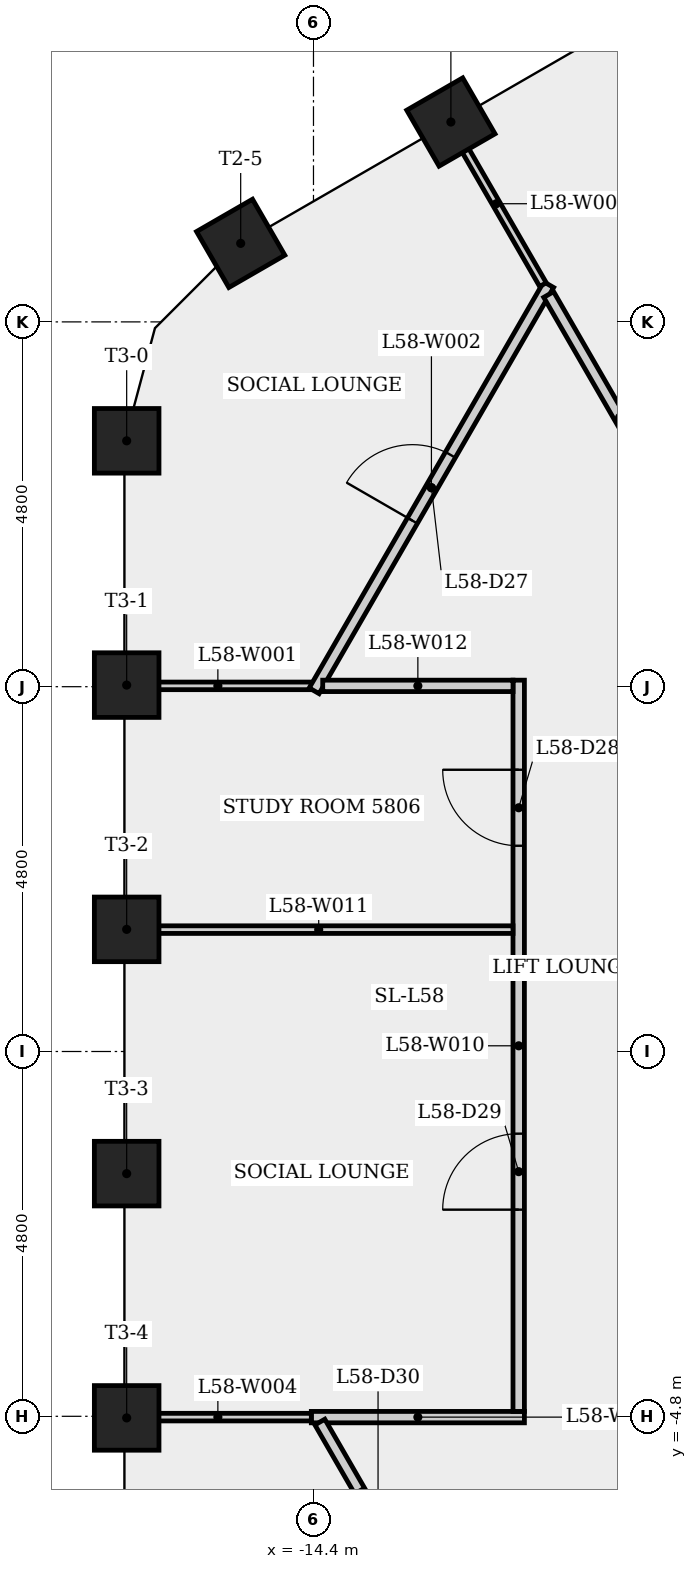
"""IFC4 building model, lengths in metres.
Left out: names, types, materials, properties, quantities, classifications, styles, units other than length and angle.
Written with IfcOpenShell. Run it as: python <this file> out.ifc"""

import sys

from ifc_helpers import new_model, si_unit, direction, frame, frame_2d, origin, origin_2d, place, context, subcontext, project, spatial, rectangle, extrude, element, fill, save


model = new_model("IFC4")
c1 = context("Model", 3, precision=1e-05, world=origin(), true_north=direction((0.0, 1.0)))
c2 = subcontext(c1, "Body", "Model", "MODEL_VIEW")
j1 = project(units=[si_unit("LENGTHUNIT", "METRE"), si_unit("PLANEANGLEUNIT", "RADIAN")], contexts=[c1])
p1 = place(None, origin())
s1 = spatial("IfcSite", under=j1, at=p1, CompositionType="ELEMENT")
p2 = place(p1, origin())
s2 = spatial("IfcBuilding", under=s1, at=p2, CompositionType="ELEMENT")
p3 = place(p2, frame((0.0, 0.0, 218.9)))
s3 = spatial("IfcBuildingStorey", under=s2, at=p3, CompositionType="ELEMENT", Elevation=218.9)
for number, where, z_axis, x_axis in (
    (1, (-12.592, 12.23, 0.0), (0.0, 0.0, 1.0), (-0.5, 0.866, 0.0)),
    (2, (-15.358, 10.633, 0.0), (0.0, 0.0, 1.0), (-0.5, 0.866, 0.0)),
    (3, (-16.858, 8.035, 0.0), (0.0, 0.0, 1.0), (-1.0, 0.0, 0.0)),
    (4, (-16.858, 4.821, 0.0), (0.0, 0.0, 1.0), (-1.0, 0.0, 0.0)),
    (5, (-16.858, 1.607, 0.0), (0.0, 0.0, 1.0), (-1.0, 0.0, 0.0)),
    (6, (-16.858, -1.607, 0.0), (0.0, 0.0, 1.0), (-1.0, 0.0, 0.0)),
    (7, (-16.858, -4.821, 0.0), (0.0, 0.0, 1.0), (-1.0, 0.0, 0.0)),
):
    element("IfcColumn", number, at=place(p3, frame(where, z_axis=z_axis, x_axis=x_axis)), inside=s3, PredefinedType="COLUMN", context=c2, shape_type="SweptSolid", body=[
        extrude(rectangle(XDim=0.85, YDim=0.85, at=origin_2d()), origin(), (0.0, 0.0, 1.0), 3.4),
    ])
p4 = place(p3, frame((-14.428, 4.811, 0.0), z_axis=(0.0, 0.0, 1.0), x_axis=(-1.0, 0.0, 0.0)))
e8 = element("IfcWall", 8, at=p4, inside=s3, PredefinedType="PARTITIONING", context=c2, shape_type="SweptSolid", body=[
    extrude(rectangle(XDim=2.459, YDim=0.1, at=frame_2d((1.229, 0.0))), origin(), (0.0, 0.0, 1.0), 3.05),
])
p5 = place(p3, frame((-14.391, 4.746, 0.0), z_axis=(0.0, 0.0, 1.0), x_axis=(0.500023814363, 0.866011654119, 0.0)))
e9 = element("IfcWall", 9, at=p5, inside=s3, PredefinedType="PARTITIONING", context=c2, shape_type="SweptSolid", body=[
    extrude(rectangle(XDim=6.171, YDim=0.15, at=frame_2d((3.085, 0.0))), origin(), (0.0, 0.0, 1.0), 3.05),
])
p6 = place(p5, frame((2.585, 0.0, 0.0)))
e10 = element("IfcOpeningElement", 10, at=p6, cuts=e9, PredefinedType="OPENING", context=c2, shape_type="SweptSolid", body=[
    extrude(rectangle(XDim=1.0, YDim=2.1, at=frame_2d((0.5, 1.05))), frame((0.0, 0.085, 0.0), z_axis=(0.0, -1.0, 0.0), x_axis=(1.0, 0.0, 0.0)), (0.0, 0.0, 1.0), 0.17),
])
p7 = place(p3, frame((-14.428, -4.811, 0.0), z_axis=(0.0, 0.0, 1.0), x_axis=(1.0, 0.0, 0.0)))
e11 = element("IfcWall", 11, at=p7, inside=s3, PredefinedType="PARTITIONING", context=c2, shape_type="SweptSolid", body=[
    extrude(rectangle(XDim=2.803, YDim=0.15, at=frame_2d((1.402, 0.0))), origin(), (0.0, 0.0, 1.0), 3.05),
])
p8 = place(p3, frame((-14.428, -4.811, 0.0), z_axis=(0.0, 0.0, 1.0), x_axis=(-1.0, 0.0, 0.0)))
e12 = element("IfcWall", 12, at=p8, inside=s3, PredefinedType="PARTITIONING", context=c2, shape_type="SweptSolid", body=[
    extrude(rectangle(XDim=2.459, YDim=0.1, at=frame_2d((1.229, 0.0))), origin(), (0.0, 0.0, 1.0), 3.05),
])
p9 = place(p3, frame((-12.785, -7.528, 0.0), z_axis=(0.0, 0.0, 1.0), x_axis=(-0.499989318644, 0.86603157058, 0.0)))
e13 = element("IfcWall", 13, at=p9, inside=s3, PredefinedType="PARTITIONING", context=c2, shape_type="SweptSolid", body=[
    extrude(rectangle(XDim=3.062, YDim=0.15, at=frame_2d((1.531, 0.0))), origin(), (0.0, 0.0, 1.0), 3.05),
])
p10 = place(p9, frame((1.031, 0.0, 0.0)))
e14 = element("IfcOpeningElement", 14, at=p10, cuts=e13, PredefinedType="OPENING", context=c2, shape_type="SweptSolid", body=[
    extrude(rectangle(XDim=1.0, YDim=2.1, at=frame_2d((0.5, 1.05))), frame((0.0, 0.085, 0.0), z_axis=(0.0, -1.0, 0.0), x_axis=(1.0, 0.0, 0.0)), (0.0, 0.0, 1.0), 0.17),
])
p11 = place(p3, frame((-12.61, 12.219, 0.0), z_axis=(0.0, 0.0, 1.0), x_axis=(0.500026134388, -0.866010314562, 0.0)))
e15 = element("IfcWall", 15, at=p11, inside=s3, PredefinedType="PARTITIONING", context=c2, shape_type="SweptSolid", body=[
    extrude(rectangle(XDim=2.459, YDim=0.1, at=frame_2d((1.229, 0.0))), origin(), (0.0, 0.0, 1.0), 3.05),
])
p12 = place(p3, frame((-11.7, -4.736, 0.0), z_axis=(0.0, 0.0, 1.0), x_axis=(0.0, 1.0, 0.0)))
e16 = element("IfcWall", 16, at=p12, inside=s3, PredefinedType="PARTITIONING", context=c2, shape_type="SweptSolid", body=[
    extrude(rectangle(XDim=9.622, YDim=0.15, at=frame_2d((4.811, 0.0))), origin(), (0.0, 0.0, 1.0), 3.05),
])
p13 = place(p12, frame((7.443, 0.0, 0.0)))
e17 = element("IfcOpeningElement", 17, at=p13, cuts=e16, PredefinedType="OPENING", context=c2, shape_type="SweptSolid", body=[
    extrude(rectangle(XDim=1.0, YDim=2.1, at=frame_2d((0.5, 1.05))), frame((0.0, 0.085, 0.0), z_axis=(0.0, -1.0, 0.0), x_axis=(1.0, 0.0, 0.0)), (0.0, 0.0, 1.0), 0.17),
])
p14 = place(p12, frame((2.655, 0.0, 0.0)))
e18 = element("IfcOpeningElement", 18, at=p14, cuts=e16, PredefinedType="OPENING", context=c2, shape_type="SweptSolid", body=[
    extrude(rectangle(XDim=1.0, YDim=2.1, at=frame_2d((0.5, 1.05))), frame((0.0, 0.085, 0.0), z_axis=(0.0, -1.0, 0.0), x_axis=(1.0, 0.0, 0.0)), (0.0, 0.0, 1.0), 0.17),
])
p15 = place(p3, frame((-11.775, 1.604, 0.0), z_axis=(0.0, 0.0, 1.0), x_axis=(-1.0, 0.0, 0.0)))
e19 = element("IfcWall", 19, at=p15, inside=s3, PredefinedType="PARTITIONING", context=c2, shape_type="SweptSolid", body=[
    extrude(rectangle(XDim=5.113, YDim=0.1, at=frame_2d((2.556, 0.0))), origin(), (0.0, 0.0, 1.0), 3.05),
])
p16 = place(p3, frame((-11.775, 4.811, 0.0), z_axis=(0.0, 0.0, 1.0), x_axis=(-1.0, 0.0, 0.0)))
e20 = element("IfcWall", 20, at=p16, inside=s3, PredefinedType="PARTITIONING", context=c2, shape_type="SweptSolid", body=[
    extrude(rectangle(XDim=2.504, YDim=0.15, at=frame_2d((1.252, 0.0))), origin(), (0.0, 0.0, 1.0), 3.05),
])
p17 = place(p3, frame((-11.305, 9.96, 0.0), z_axis=(0.0, 0.0, 1.0), x_axis=(0.499979060117, -0.866037493094, 0.0)))
e21 = element("IfcWall", 21, at=p17, inside=s3, PredefinedType="PARTITIONING", context=c2, shape_type="SweptSolid", body=[
    extrude(rectangle(XDim=3.734, YDim=0.15, at=frame_2d((1.867, 0.0))), origin(), (0.0, 0.0, 1.0), 3.05),
])
p18 = place(p6, origin())
e22 = element("IfcDoor", 22, at=p18, inside=s3, OperationType="SINGLE_SWING_LEFT", PredefinedType="DOOR", context=c2, shape_type="SweptSolid", body=[
    extrude(rectangle(XDim=1.0, YDim=2.1, at=frame_2d((0.5, 1.05))), frame((0.0, 0.025, 0.0), z_axis=(0.0, -1.0, 0.0), x_axis=(1.0, 0.0, 0.0)), (0.0, 0.0, 1.0), 0.05),
])
fill(e10, e22)
p19 = place(p13, origin())
e23 = element("IfcDoor", 23, at=p19, inside=s3, OperationType="SINGLE_SWING_RIGHT", PredefinedType="DOOR", context=c2, shape_type="SweptSolid", body=[
    extrude(rectangle(XDim=1.0, YDim=2.1, at=frame_2d((0.5, 1.05))), frame((0.0, 0.025, 0.0), z_axis=(0.0, -1.0, 0.0), x_axis=(1.0, 0.0, 0.0)), (0.0, 0.0, 1.0), 0.05),
])
fill(e17, e23)
p20 = place(p14, origin())
e24 = element("IfcDoor", 24, at=p20, inside=s3, OperationType="SINGLE_SWING_LEFT", PredefinedType="DOOR", context=c2, shape_type="SweptSolid", body=[
    extrude(rectangle(XDim=1.0, YDim=2.1, at=frame_2d((0.5, 1.05))), frame((0.0, 0.025, 0.0), z_axis=(0.0, -1.0, 0.0), x_axis=(1.0, 0.0, 0.0)), (0.0, 0.0, 1.0), 0.05),
])
fill(e18, e24)
p21 = place(p10, origin())
e25 = element("IfcDoor", 25, at=p21, inside=s3, OperationType="SINGLE_SWING_RIGHT", PredefinedType="DOOR", context=c2, shape_type="SweptSolid", body=[
    extrude(rectangle(XDim=1.0, YDim=2.1, at=frame_2d((0.5, 1.05))), frame((0.0, 0.025, 0.0), z_axis=(0.0, -1.0, 0.0), x_axis=(1.0, 0.0, 0.0)), (0.0, 0.0, 1.0), 0.05),
])
fill(e14, e25)
save(model, sys.argv[1])
